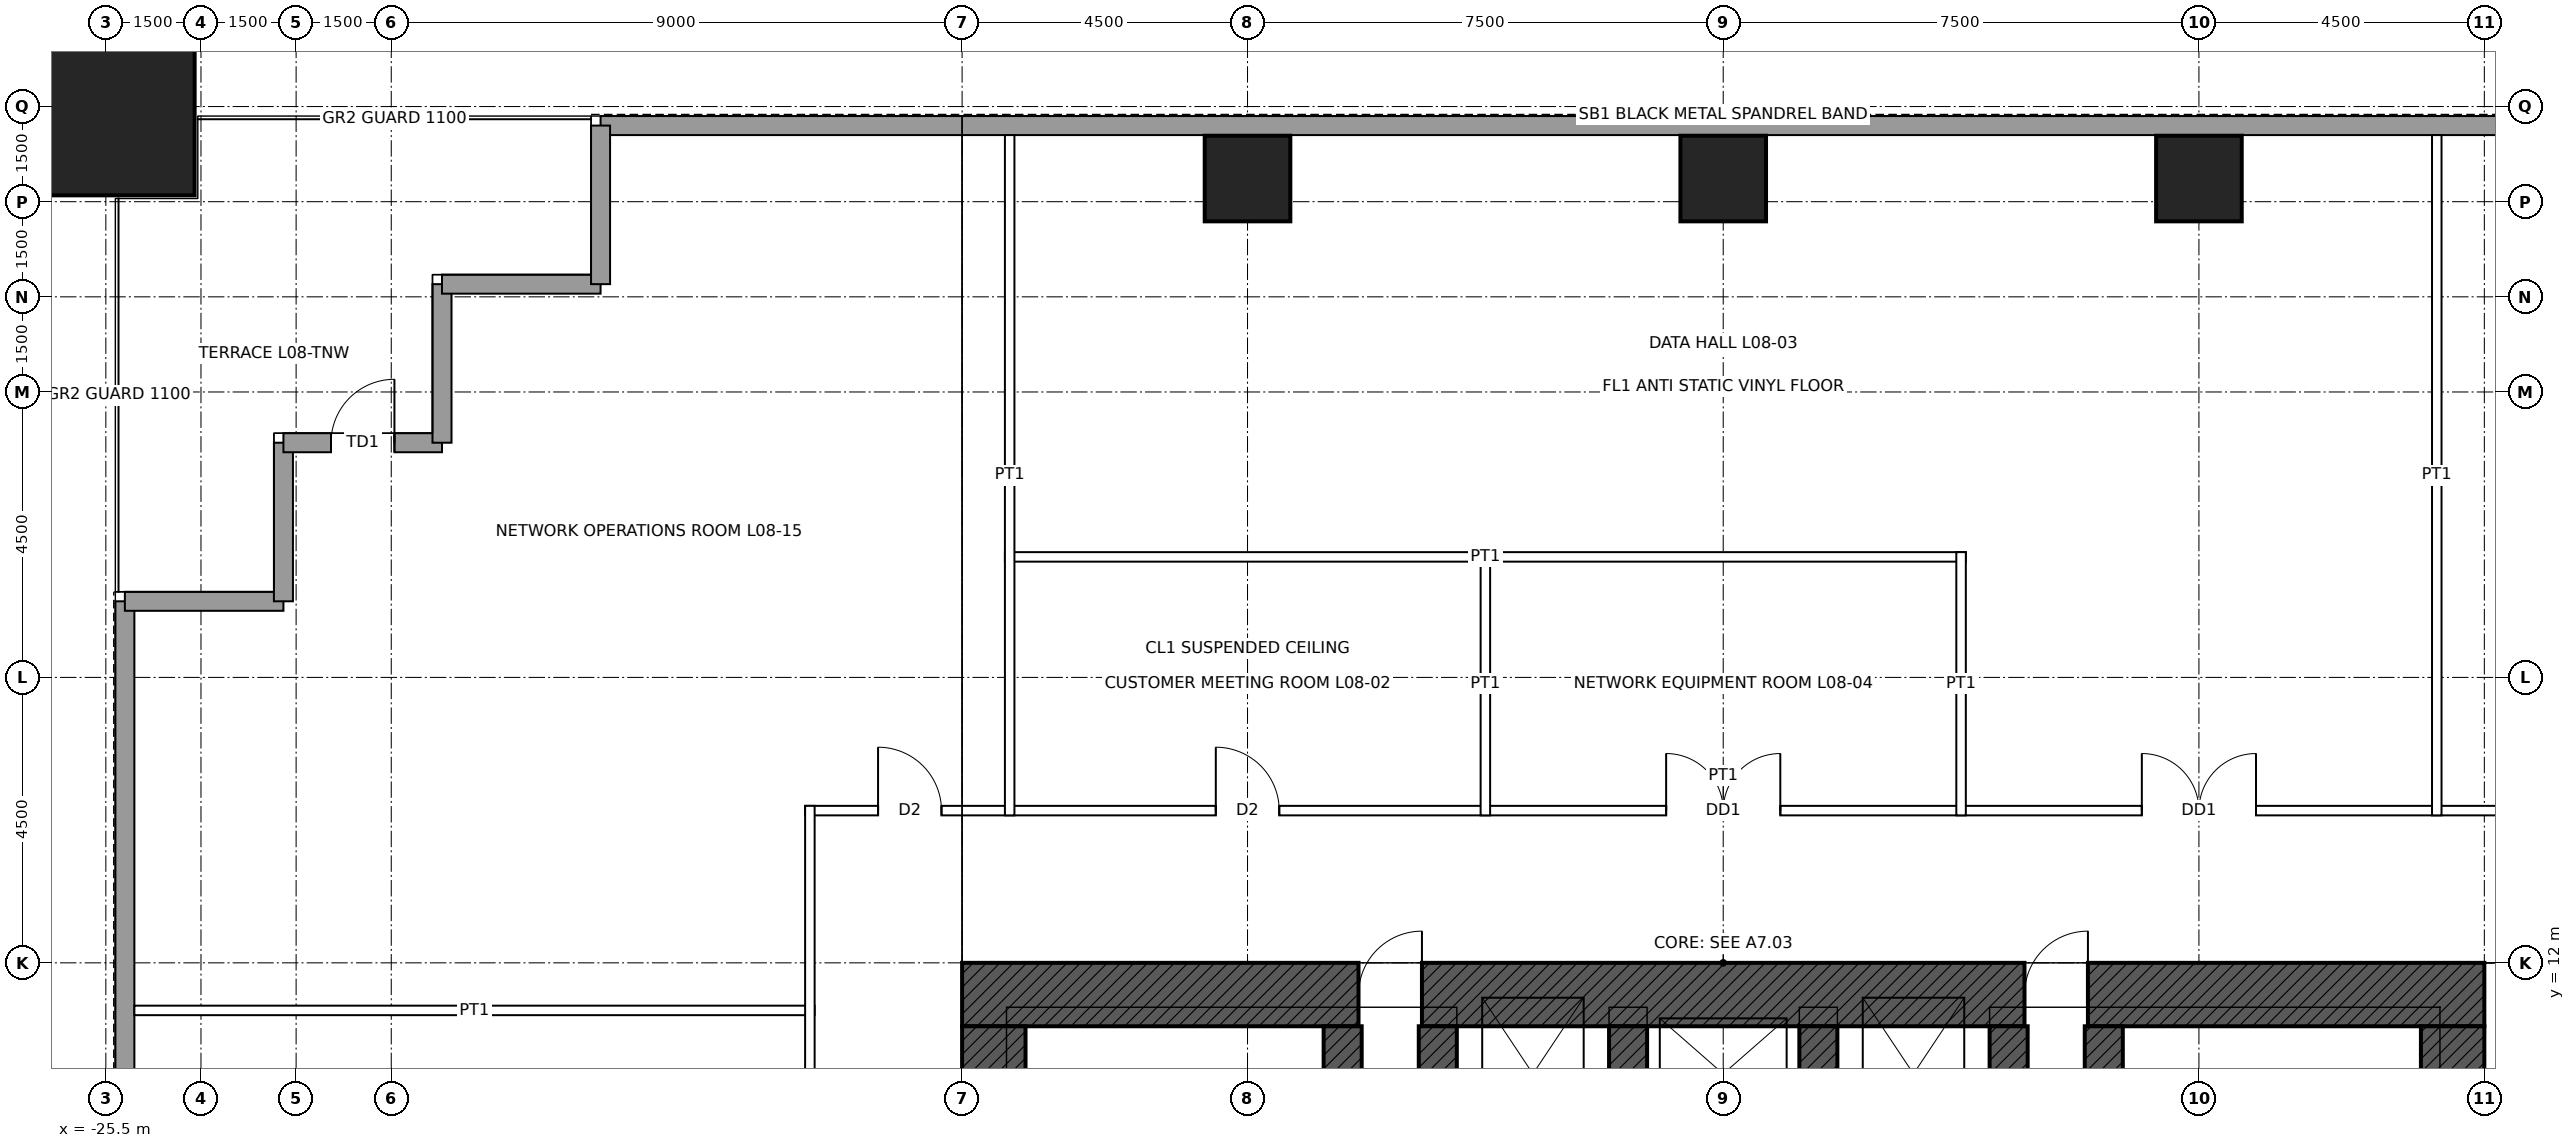
"""IFC4 building model, lengths in metres.
Left out: names, types, materials, properties, quantities, classifications, styles, units other than length and angle.
Written with IfcOpenShell. Run it as: python <this file> out.ifc"""

import sys

from ifc_helpers import new_model, si_unit, direction, frame, frame_2d, origin, origin_2d, place, context, subcontext, project, spatial, rectangle, hollow_rectangle, extrude, element, fill, save


model = new_model("IFC4")
c1 = context("Model", 3, precision=1e-05, world=origin(), true_north=direction((0.0, 1.0)))
c2 = subcontext(c1, "Body", "Model", "MODEL_VIEW")
j1 = project(units=[si_unit("LENGTHUNIT", "METRE"), si_unit("PLANEANGLEUNIT", "RADIAN")], contexts=[c1])
p1 = place(None, origin())
s1 = spatial("IfcSite", under=j1, at=p1, CompositionType="ELEMENT")
p2 = place(p1, origin())
s2 = spatial("IfcBuilding", under=s1, at=p2, CompositionType="ELEMENT")
p3 = place(p2, frame((0.0, 0.0, 43.4)))
s3 = spatial("IfcBuildingStorey", under=s2, at=p3, CompositionType="ELEMENT", Elevation=43.4)
p4 = place(p3, frame((-25.5, 25.5, 0.0), z_axis=(0.0, 0.0, 1.0), x_axis=(1.0, 0.0, 0.0)))
e1 = element("IfcColumn", 1, at=p4, inside=s3, PredefinedType="COLUMN", context=c2, shape_type="SweptSolid", body=[
    extrude(hollow_rectangle(XDim=2.8, YDim=2.8, WallThickness=0.14, at=origin_2d()), origin(), (0.0, 0.0, 1.0), 5.0),
])
for number, where, z_axis, x_axis in (
    (2, (-7.5, 24.365, 0.0), (0.0, 0.0, 1.0), (1.0, 0.0, 0.0)),
    (3, (0.0, 24.365, 0.0), (0.0, 0.0, 1.0), (1.0, 0.0, 0.0)),
    (4, (7.5, 24.365, 0.0), (0.0, 0.0, 1.0), (1.0, 0.0, 0.0)),
):
    element("IfcColumn", number, at=place(p3, frame(where, z_axis=z_axis, x_axis=x_axis)), inside=s3, PredefinedType="COLUMN", context=c2, shape_type="SweptSolid", body=[
        extrude(hollow_rectangle(XDim=1.35, YDim=1.35, WallThickness=0.085, at=origin_2d()), origin(), (0.0, 0.0, 1.0), 5.0),
    ])
p5 = place(p3, frame((-12.0, 11.5, 0.0), z_axis=(0.0, 0.0, 1.0), x_axis=(1.0, 0.0, 0.0)))
e5 = element("IfcWall", 5, at=p5, inside=s3, PredefinedType="SHEAR", context=c2, shape_type="SweptSolid", body=[
    extrude(rectangle(XDim=24.0, YDim=1.0, at=frame_2d((12.0, 0.0))), origin(), (0.0, 0.0, 1.0), 5.0),
])
p6 = place(p5, frame((6.25, 0.0, 0.0)))
e6 = element("IfcOpeningElement", 6, at=p6, cuts=e5, PredefinedType="OPENING", context=c2, shape_type="SweptSolid", body=[
    extrude(rectangle(XDim=1.0, YDim=2.4, at=frame_2d((0.5, 1.2))), frame((0.0, 0.51, 0.0), z_axis=(0.0, -1.0, 0.0), x_axis=(1.0, 0.0, 0.0)), (0.0, 0.0, 1.0), 1.02),
])
p7 = place(p5, frame((16.75, 0.0, 0.0)))
e7 = element("IfcOpeningElement", 7, at=p7, cuts=e5, PredefinedType="OPENING", context=c2, shape_type="SweptSolid", body=[
    extrude(rectangle(XDim=1.0, YDim=2.4, at=frame_2d((0.5, 1.2))), frame((0.0, 0.51, 0.0), z_axis=(0.0, -1.0, 0.0), x_axis=(1.0, 0.0, 0.0)), (0.0, 0.0, 1.0), 1.02),
])
p8 = place(p3, frame((11.5, 11.0, 0.0), z_axis=(0.0, 0.0, 1.0), x_axis=(0.0, -1.0, 0.0)))
e8 = element("IfcWall", 8, at=p8, inside=s3, PredefinedType="SHEAR", context=c2, shape_type="SweptSolid", body=[
    extrude(rectangle(XDim=22.0, YDim=1.0, at=frame_2d((11.0, 0.0))), origin(), (0.0, 0.0, 1.0), 5.0),
])
p9 = place(p8, frame((10.5, 0.0, 0.0)))
e9 = element("IfcOpeningElement", 9, at=p9, cuts=e8, PredefinedType="OPENING", context=c2, shape_type="SweptSolid", body=[
    extrude(rectangle(XDim=1.0, YDim=2.4, at=frame_2d((0.5, 1.2))), frame((0.0, 0.51, 0.0), z_axis=(0.0, -1.0, 0.0), x_axis=(1.0, 0.0, 0.0)), (0.0, 0.0, 1.0), 1.02),
])
p10 = place(p3, frame((-11.5, -11.0, 0.0), z_axis=(0.0, 0.0, 1.0), x_axis=(0.0, 1.0, 0.0)))
e10 = element("IfcWall", 10, at=p10, inside=s3, PredefinedType="SHEAR", context=c2, shape_type="SweptSolid", body=[
    extrude(rectangle(XDim=22.0, YDim=1.0, at=frame_2d((11.0, 0.0))), origin(), (0.0, 0.0, 1.0), 5.0),
])
p11 = place(p10, frame((10.5, 0.0, 0.0)))
e11 = element("IfcOpeningElement", 11, at=p11, cuts=e10, PredefinedType="OPENING", context=c2, shape_type="SweptSolid", body=[
    extrude(rectangle(XDim=1.0, YDim=2.4, at=frame_2d((0.5, 1.2))), frame((0.0, 0.51, 0.0), z_axis=(0.0, -1.0, 0.0), x_axis=(1.0, 0.0, 0.0)), (0.0, 0.0, 1.0), 1.02),
])
p12 = place(p3, frame((-6.0, 4.5, 0.0), z_axis=(0.0, 0.0, 1.0), x_axis=(0.0, 1.0, 0.0)))
e12 = element("IfcWall", 12, at=p12, inside=s3, PredefinedType="SHEAR", context=c2, shape_type="SweptSolid", body=[
    extrude(rectangle(XDim=6.5, YDim=0.6, at=frame_2d((3.25, 0.0))), origin(), (0.0, 0.0, 1.0), 5.0),
])
p13 = place(p12, frame((0.6, 0.0, 0.0)))
e13 = element("IfcOpeningElement", 13, at=p13, cuts=e12, PredefinedType="OPENING", context=c2, shape_type="SweptSolid", body=[
    extrude(rectangle(XDim=1.0, YDim=2.1, at=frame_2d((0.5, 1.05))), frame((0.0, 0.31, 0.0), z_axis=(0.0, -1.0, 0.0), x_axis=(1.0, 0.0, 0.0)), (0.0, 0.0, 1.0), 0.62),
])
p14 = place(p3, frame((6.0, 4.5, 0.0), z_axis=(0.0, 0.0, 1.0), x_axis=(0.0, 1.0, 0.0)))
e14 = element("IfcWall", 14, at=p14, inside=s3, PredefinedType="SHEAR", context=c2, shape_type="SweptSolid", body=[
    extrude(rectangle(XDim=6.5, YDim=0.6, at=frame_2d((3.25, 0.0))), origin(), (0.0, 0.0, 1.0), 5.0),
])
p15 = place(p14, frame((0.6, 0.0, 0.0)))
e15 = element("IfcOpeningElement", 15, at=p15, cuts=e14, PredefinedType="OPENING", context=c2, shape_type="SweptSolid", body=[
    extrude(rectangle(XDim=1.0, YDim=2.1, at=frame_2d((0.5, 1.05))), frame((0.0, 0.31, 0.0), z_axis=(0.0, -1.0, 0.0), x_axis=(1.0, 0.0, 0.0)), (0.0, 0.0, 1.0), 0.62),
])
for number, where, z_axis, x_axis in (
    (16, (-4.5, 8.5, 0.0), (0.0, 0.0, 1.0), (0.0, 1.0, 0.0)),
    (17, (4.5, 8.5, 0.0), (0.0, 0.0, 1.0), (0.0, 1.0, 0.0)),
    (18, (-1.5, 8.5, 0.0), (0.0, 0.0, 1.0), (0.0, 1.0, 0.0)),
    (19, (1.5, 8.5, 0.0), (0.0, 0.0, 1.0), (0.0, 1.0, 0.0)),
):
    element("IfcWall", number, at=place(p3, frame(where, z_axis=z_axis, x_axis=x_axis)), inside=s3, PredefinedType="SHEAR", context=c2, shape_type="SweptSolid", body=[
        extrude(rectangle(XDim=2.5, YDim=0.6, at=frame_2d((1.25, 0.0))), origin(), (0.0, 0.0, 1.0), 5.0),
    ])
for number, where, z_axis, x_axis in (
    (20, (-17.7, 25.2, 0.0), (0.0, 0.0, 1.0), (1.0, 0.0, 0.0)),
    (21, (-25.2, -17.7, 0.0), (0.0, 0.0, 1.0), (0.0, 1.0, 0.0)),
):
    element("IfcWall", number, at=place(p3, frame(where, z_axis=z_axis, x_axis=x_axis)), inside=s3, PredefinedType="SOLIDWALL", context=c2, shape_type="SweptSolid", body=[
        extrude(rectangle(XDim=35.4, YDim=0.3, at=frame_2d((17.7, 0.0))), origin(), (0.0, 0.0, 1.0), 4.8),
    ])
for number, where, z_axis, x_axis in (
    (22, (-25.2, 17.7, 0.0), (0.0, 0.0, 1.0), (1.0, 0.0, 0.0)),
    (23, (-22.7, 17.7, 0.0), (0.0, 0.0, 1.0), (0.0, 1.0, 0.0)),
):
    element("IfcWall", number, at=place(p3, frame(where, z_axis=z_axis, x_axis=x_axis)), inside=s3, PredefinedType="SOLIDWALL", context=c2, shape_type="SweptSolid", body=[
        extrude(rectangle(XDim=2.5, YDim=0.3, at=frame_2d((1.25, 0.0))), origin(), (0.0, 0.0, 1.0), 4.8),
    ])
p16 = place(p3, frame((-22.7, 20.2, 0.0), z_axis=(0.0, 0.0, 1.0), x_axis=(1.0, 0.0, 0.0)))
e24 = element("IfcWall", 24, at=p16, inside=s3, PredefinedType="SOLIDWALL", context=c2, shape_type="SweptSolid", body=[
    extrude(rectangle(XDim=2.5, YDim=0.3, at=frame_2d((1.25, 0.0))), origin(), (0.0, 0.0, 1.0), 4.8),
])
p17 = place(p16, frame((0.75, 0.0, 0.0)))
e25 = element("IfcOpeningElement", 25, at=p17, cuts=e24, PredefinedType="OPENING", context=c2, shape_type="SweptSolid", body=[
    extrude(rectangle(XDim=1.0, YDim=2.4, at=frame_2d((0.5, 1.2))), frame((0.0, 0.16, 0.0), z_axis=(0.0, -1.0, 0.0), x_axis=(1.0, 0.0, 0.0)), (0.0, 0.0, 1.0), 0.32),
])
for number, where, z_axis, x_axis in (
    (26, (-20.2, 20.2, 0.0), (0.0, 0.0, 1.0), (0.0, 1.0, 0.0)),
    (27, (-20.2, 22.7, 0.0), (0.0, 0.0, 1.0), (1.0, 0.0, 0.0)),
    (28, (-17.7, 22.7, 0.0), (0.0, 0.0, 1.0), (0.0, 1.0, 0.0)),
):
    element("IfcWall", number, at=place(p3, frame(where, z_axis=z_axis, x_axis=x_axis)), inside=s3, PredefinedType="SOLIDWALL", context=c2, shape_type="SweptSolid", body=[
        extrude(rectangle(XDim=2.5, YDim=0.3, at=frame_2d((1.25, 0.0))), origin(), (0.0, 0.0, 1.0), 4.8),
    ])
p18 = place(p3, frame((-25.05, 11.25, 0.0), z_axis=(0.0, 0.0, 1.0), x_axis=(1.0, 0.0, 0.0)))
e29 = element("IfcWall", 29, at=p18, inside=s3, PredefinedType="PARTITIONING", context=c2, shape_type="SweptSolid", body=[
    extrude(rectangle(XDim=10.725, YDim=0.15, at=frame_2d((5.363, 0.0))), origin(), (0.0, 0.0, 1.0), 3.853),
])
p19 = place(p3, frame((-14.475, 14.4, 0.0), z_axis=(0.0, 0.0, 1.0), x_axis=(1.0, 0.0, 0.0)))
e30 = element("IfcWall", 30, at=p19, inside=s3, PredefinedType="PARTITIONING", context=c2, shape_type="SweptSolid", body=[
    extrude(rectangle(XDim=28.95, YDim=0.15, at=frame_2d((14.475, 0.0))), origin(), (0.0, 0.0, 1.0), 4.8),
])
p20 = place(p19, frame((6.475, 0.0, 0.0)))
e31 = element("IfcOpeningElement", 31, at=p20, cuts=e30, PredefinedType="OPENING", context=c2, shape_type="SweptSolid", body=[
    extrude(rectangle(XDim=1.0, YDim=2.1, at=frame_2d((0.5, 1.05))), frame((0.0, 0.085, 0.0), z_axis=(0.0, -1.0, 0.0), x_axis=(1.0, 0.0, 0.0)), (0.0, 0.0, 1.0), 0.17),
])
p21 = place(p19, frame((21.075, 0.0, 0.0)))
e32 = element("IfcOpeningElement", 32, at=p21, cuts=e30, PredefinedType="OPENING", context=c2, shape_type="SweptSolid", body=[
    extrude(rectangle(XDim=1.8, YDim=2.4, at=frame_2d((0.9, 1.2))), frame((0.0, 0.085, 0.0), z_axis=(0.0, -1.0, 0.0), x_axis=(1.0, 0.0, 0.0)), (0.0, 0.0, 1.0), 0.17),
])
p22 = place(p19, frame((13.575, 0.0, 0.0)))
e33 = element("IfcOpeningElement", 33, at=p22, cuts=e30, PredefinedType="OPENING", context=c2, shape_type="SweptSolid", body=[
    extrude(rectangle(XDim=1.8, YDim=2.4, at=frame_2d((0.9, 1.2))), frame((0.0, 0.085, 0.0), z_axis=(0.0, -1.0, 0.0), x_axis=(1.0, 0.0, 0.0)), (0.0, 0.0, 1.0), 0.17),
])
p23 = place(p19, frame((26.8, 0.0, 0.0)))
e34 = element("IfcOpeningElement", 34, at=p23, cuts=e30, PredefinedType="OPENING", context=c2, shape_type="SweptSolid", body=[
    extrude(rectangle(XDim=1.0, YDim=2.1, at=frame_2d((0.5, 1.05))), frame((0.0, 0.085, 0.0), z_axis=(0.0, -1.0, 0.0), x_axis=(1.0, 0.0, 0.0)), (0.0, 0.0, 1.0), 0.17),
])
p24 = place(p19, frame((1.15, 0.0, 0.0)))
e35 = element("IfcOpeningElement", 35, at=p24, cuts=e30, PredefinedType="OPENING", context=c2, shape_type="SweptSolid", body=[
    extrude(rectangle(XDim=1.0, YDim=2.1, at=frame_2d((0.5, 1.05))), frame((0.0, 0.085, 0.0), z_axis=(0.0, -1.0, 0.0), x_axis=(1.0, 0.0, 0.0)), (0.0, 0.0, 1.0), 0.17),
])
p25 = place(p3, frame((-11.325, 18.4, 0.0), z_axis=(0.0, 0.0, 1.0), x_axis=(1.0, 0.0, 0.0)))
e36 = element("IfcWall", 36, at=p25, inside=s3, PredefinedType="PARTITIONING", context=c2, shape_type="SweptSolid", body=[
    extrude(rectangle(XDim=15.15, YDim=0.15, at=frame_2d((7.575, 0.0))), origin(), (0.0, 0.0, 1.0), 4.8),
])
p26 = place(p3, frame((-14.4, -14.475, 0.0), z_axis=(0.0, 0.0, 1.0), x_axis=(0.0, 1.0, 0.0)))
e37 = element("IfcWall", 37, at=p26, inside=s3, PredefinedType="PARTITIONING", context=c2, shape_type="SweptSolid", body=[
    extrude(rectangle(XDim=28.95, YDim=0.15, at=frame_2d((14.475, 0.0))), origin(), (0.0, 0.0, 1.0), 4.8),
])
p27 = place(p26, frame((10.225, 0.0, 0.0)))
e38 = element("IfcOpeningElement", 38, at=p27, cuts=e37, PredefinedType="OPENING", context=c2, shape_type="SweptSolid", body=[
    extrude(rectangle(XDim=1.0, YDim=2.1, at=frame_2d((0.5, 1.05))), frame((0.0, 0.085, 0.0), z_axis=(0.0, -1.0, 0.0), x_axis=(1.0, 0.0, 0.0)), (0.0, 0.0, 1.0), 0.17),
])
p28 = place(p26, frame((21.075, 0.0, 0.0)))
e39 = element("IfcOpeningElement", 39, at=p28, cuts=e37, PredefinedType="OPENING", context=c2, shape_type="SweptSolid", body=[
    extrude(rectangle(XDim=1.8, YDim=2.4, at=frame_2d((0.9, 1.2))), frame((0.0, 0.085, 0.0), z_axis=(0.0, -1.0, 0.0), x_axis=(1.0, 0.0, 0.0)), (0.0, 0.0, 1.0), 0.17),
])
p29 = place(p3, frame((-11.25, 14.325, 0.0), z_axis=(0.0, 0.0, 1.0), x_axis=(0.0, 1.0, 0.0)))
e40 = element("IfcWall", 40, at=p29, inside=s3, PredefinedType="PARTITIONING", context=c2, shape_type="SweptSolid", body=[
    extrude(rectangle(XDim=10.725, YDim=0.15, at=frame_2d((5.363, 0.0))), origin(), (0.0, 0.0, 1.0), 3.853),
])
for number, where, z_axis, x_axis in (
    (41, (-3.75, 14.325, 0.0), (0.0, 0.0, 1.0), (0.0, 1.0, 0.0)),
    (42, (3.75, 14.325, 0.0), (0.0, 0.0, 1.0), (0.0, 1.0, 0.0)),
):
    element("IfcWall", number, at=place(p3, frame(where, z_axis=z_axis, x_axis=x_axis)), inside=s3, PredefinedType="PARTITIONING", context=c2, shape_type="SweptSolid", body=[
        extrude(rectangle(XDim=4.15, YDim=0.15, at=frame_2d((2.075, 0.0))), origin(), (0.0, 0.0, 1.0), 3.853),
    ])
p30 = place(p3, frame((11.25, 14.325, 0.0), z_axis=(0.0, 0.0, 1.0), x_axis=(0.0, 1.0, 0.0)))
e43 = element("IfcWall", 43, at=p30, inside=s3, PredefinedType="PARTITIONING", context=c2, shape_type="SweptSolid", body=[
    extrude(rectangle(XDim=10.725, YDim=0.15, at=frame_2d((5.363, 0.0))), origin(), (0.0, 0.0, 1.0), 3.853),
])
p31 = place(p17, origin())
e44 = element("IfcDoor", 44, at=p31, inside=s3, OperationType="SINGLE_SWING_RIGHT", PredefinedType="DOOR", context=c2, shape_type="SweptSolid", body=[
    extrude(rectangle(XDim=1.0, YDim=2.4, at=frame_2d((0.5, 1.2))), frame((0.0, 0.025, 0.0), z_axis=(0.0, -1.0, 0.0), x_axis=(1.0, 0.0, 0.0)), (0.0, 0.0, 1.0), 0.05),
])
fill(e25, e44)
p32 = place(p6, origin())
e45 = element("IfcDoor", 45, at=p32, inside=s3, OperationType="SINGLE_SWING_RIGHT", PredefinedType="DOOR", context=c2, shape_type="SweptSolid", body=[
    extrude(rectangle(XDim=1.0, YDim=2.4, at=frame_2d((0.5, 1.2))), frame((0.0, 0.485, 0.0), z_axis=(0.0, -1.0, 0.0), x_axis=(1.0, 0.0, 0.0)), (0.0, 0.0, 1.0), 0.05),
])
fill(e6, e45)
p33 = place(p7, origin())
e46 = element("IfcDoor", 46, at=p33, inside=s3, OperationType="SINGLE_SWING_RIGHT", PredefinedType="DOOR", context=c2, shape_type="SweptSolid", body=[
    extrude(rectangle(XDim=1.0, YDim=2.4, at=frame_2d((0.5, 1.2))), frame((0.0, 0.485, 0.0), z_axis=(0.0, -1.0, 0.0), x_axis=(1.0, 0.0, 0.0)), (0.0, 0.0, 1.0), 0.05),
])
fill(e7, e46)
p34 = place(p20, origin())
e47 = element("IfcDoor", 47, at=p34, inside=s3, OperationType="SINGLE_SWING_LEFT", PredefinedType="DOOR", context=c2, shape_type="SweptSolid", body=[
    extrude(rectangle(XDim=1.0, YDim=2.1, at=frame_2d((0.5, 1.05))), frame((0.0, 0.025, 0.0), z_axis=(0.0, -1.0, 0.0), x_axis=(1.0, 0.0, 0.0)), (0.0, 0.0, 1.0), 0.05),
])
fill(e31, e47)
p35 = place(p21, origin())
e48 = element("IfcDoor", 48, at=p35, inside=s3, OperationType="DOUBLE_DOOR_SINGLE_SWING", PredefinedType="DOOR", context=c2, shape_type="SweptSolid", body=[
    extrude(rectangle(XDim=1.8, YDim=2.4, at=frame_2d((0.9, 1.2))), frame((0.0, 0.025, 0.0), z_axis=(0.0, -1.0, 0.0), x_axis=(1.0, 0.0, 0.0)), (0.0, 0.0, 1.0), 0.05),
])
fill(e32, e48)
p36 = place(p22, origin())
e49 = element("IfcDoor", 49, at=p36, inside=s3, OperationType="DOUBLE_DOOR_SINGLE_SWING", PredefinedType="DOOR", context=c2, shape_type="SweptSolid", body=[
    extrude(rectangle(XDim=1.8, YDim=2.4, at=frame_2d((0.9, 1.2))), frame((0.0, 0.025, 0.0), z_axis=(0.0, -1.0, 0.0), x_axis=(1.0, 0.0, 0.0)), (0.0, 0.0, 1.0), 0.05),
])
fill(e33, e49)
p37 = place(p24, origin())
e50 = element("IfcDoor", 50, at=p37, inside=s3, OperationType="SINGLE_SWING_LEFT", PredefinedType="DOOR", context=c2, shape_type="SweptSolid", body=[
    extrude(rectangle(XDim=1.0, YDim=2.1, at=frame_2d((0.5, 1.05))), frame((0.0, 0.025, 0.0), z_axis=(0.0, -1.0, 0.0), x_axis=(1.0, 0.0, 0.0)), (0.0, 0.0, 1.0), 0.05),
])
fill(e35, e50)
save(model, sys.argv[1])
